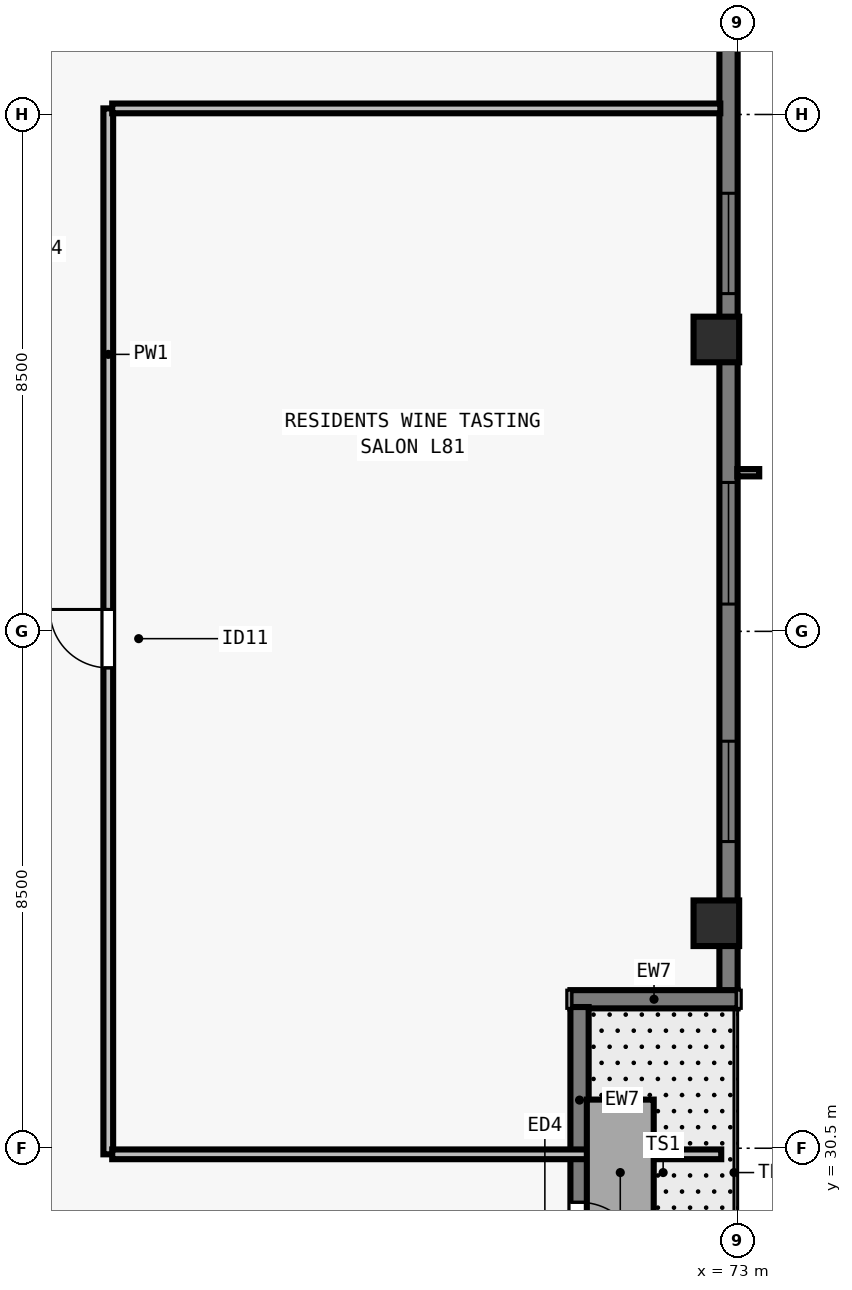
"""IFC4 building model, lengths in metres.
Left out: names, types, materials, properties, quantities, classifications, styles, units other than length and angle.
Written with IfcOpenShell. Run it as: python <this file> out.ifc"""

import sys

from ifc_helpers import new_model, si_unit, direction, frame, frame_2d, origin, origin_2d, place, context, subcontext, project, spatial, rectangle, extrude, element, fill, save


model = new_model("IFC4")
c1 = context("Model", 3, precision=1e-05, world=origin(), true_north=direction((0.0, 1.0)))
c2 = subcontext(c1, "Body", "Model", "MODEL_VIEW")
j1 = project(units=[si_unit("LENGTHUNIT", "METRE"), si_unit("PLANEANGLEUNIT", "RADIAN")], contexts=[c1])
p1 = place(None, origin())
s1 = spatial("IfcSite", under=j1, at=p1, CompositionType="ELEMENT")
p2 = place(p1, origin())
s2 = spatial("IfcBuilding", under=s1, at=p2, CompositionType="ELEMENT")
p3 = place(p2, frame((0.0, 0.0, 294.5)))
s3 = spatial("IfcBuildingStorey", under=s2, at=p3, CompositionType="ELEMENT", Elevation=294.5)
for number, where, z_axis, x_axis in (
    (1, (72.65, 34.2, 0.0), (0.0, 0.0, 1.0), (0.0, 1.0, 0.0)),
    (2, (72.65, 43.8, 0.0), (0.0, 0.0, 1.0), (0.0, 1.0, 0.0)),
):
    element("IfcColumn", number, at=place(p3, frame(where, z_axis=z_axis, x_axis=x_axis)), inside=s3, PredefinedType="COLUMN", context=c2, shape_type="SweptSolid", body=[
        extrude(rectangle(XDim=0.75, YDim=0.75, at=origin_2d()), origin(), (0.0, 0.0, 1.0), 3.5),
    ])
p4 = place(p3, frame((72.85, 54.5, 0.0), z_axis=(0.0, 0.0, 1.0), x_axis=(0.0, -1.0, 0.0)))
e3 = element("IfcWall", 3, at=p4, inside=s3, PredefinedType="SOLIDWALL", context=c2, shape_type="SweptSolid", body=[
    extrude(rectangle(XDim=21.422, YDim=0.3, at=frame_2d((10.711, 0.0))), origin(), (0.0, 0.0, 1.0), 3.29),
])
p5 = place(p4, frame((8.296, 0.0, 0.8)))
e4 = element("IfcOpeningElement", 4, at=p5, cuts=e3, PredefinedType="OPENING", context=c2, shape_type="SweptSolid", body=[
    extrude(rectangle(XDim=1.65, YDim=1.758, at=frame_2d((0.825, 0.879))), frame((0.0, 0.16, 0.0), z_axis=(0.0, -1.0, 0.0), x_axis=(1.0, 0.0, 0.0)), (0.0, 0.0, 1.0), 0.32),
])
p6 = place(p4, frame((13.051, 0.0, 0.8)))
e5 = element("IfcOpeningElement", 5, at=p6, cuts=e3, PredefinedType="OPENING", context=c2, shape_type="SweptSolid", body=[
    extrude(rectangle(XDim=2.0, YDim=1.758, at=frame_2d((1.0, 0.879))), frame((0.0, 0.16, 0.0), z_axis=(0.0, -1.0, 0.0), x_axis=(1.0, 0.0, 0.0)), (0.0, 0.0, 1.0), 0.32),
])
p7 = place(p4, frame((17.307, 0.0, 0.8)))
e6 = element("IfcOpeningElement", 6, at=p7, cuts=e3, PredefinedType="OPENING", context=c2, shape_type="SweptSolid", body=[
    extrude(rectangle(XDim=1.65, YDim=1.758, at=frame_2d((0.825, 0.879))), frame((0.0, 0.16, 0.0), z_axis=(0.0, -1.0, 0.0), x_axis=(1.0, 0.0, 0.0)), (0.0, 0.0, 1.0), 0.32),
])
p8 = place(p3, frame((73.0, 32.95, 0.0), z_axis=(0.0, 0.0, 1.0), x_axis=(-1.0, 0.0, 0.0)))
e7 = element("IfcWall", 7, at=p8, inside=s3, PredefinedType="SOLIDWALL", context=c2, shape_type="SweptSolid", body=[
    extrude(rectangle(XDim=2.75, YDim=0.3, at=frame_2d((1.375, 0.0))), origin(), (0.0, 0.0, 1.0), 3.29),
])
p9 = place(p3, frame((70.4, 32.822, 0.0), z_axis=(0.0, 0.0, 1.0), x_axis=(0.0, -1.0, 0.0)))
e8 = element("IfcWall", 8, at=p9, inside=s3, PredefinedType="SOLIDWALL", context=c2, shape_type="SweptSolid", body=[
    extrude(rectangle(XDim=5.722, YDim=0.3, at=frame_2d((2.861, 0.0))), origin(), (0.0, 0.0, 1.0), 3.29),
])
p10 = place(p9, frame((3.211, 0.0, 0.0)))
e9 = element("IfcOpeningElement", 9, at=p10, cuts=e8, PredefinedType="OPENING", context=c2, shape_type="SweptSolid", body=[
    extrude(rectangle(XDim=1.0, YDim=2.15, at=frame_2d((0.5, 1.075))), frame((0.0, 0.16, 0.0), z_axis=(0.0, -1.0, 0.0), x_axis=(1.0, 0.0, 0.0)), (0.0, 0.0, 1.0), 0.32),
])
p11 = place(p3, frame((62.65, 30.4, 0.0), z_axis=(0.0, 0.0, 1.0), x_axis=(0.0, 1.0, 0.0)))
e10 = element("IfcWall", 10, at=p11, inside=s3, PredefinedType="PARTITIONING", context=c2, shape_type="SweptSolid", body=[
    extrude(rectangle(XDim=17.2, YDim=0.16, at=frame_2d((8.6, 0.0))), origin(), (0.0, 0.0, 1.0), 3.29),
])
p12 = place(p11, frame((8.0, 0.0, 0.0)))
e11 = element("IfcOpeningElement", 11, at=p12, cuts=e10, PredefinedType="OPENING", context=c2, shape_type="SweptSolid", body=[
    extrude(rectangle(XDim=0.96, YDim=2.12, at=frame_2d((0.48, 1.06))), frame((0.0, 0.09, 0.0), z_axis=(0.0, -1.0, 0.0), x_axis=(1.0, 0.0, 0.0)), (0.0, 0.0, 1.0), 0.18),
])
p13 = place(p3, frame((62.715, 30.4, 0.0), z_axis=(0.0, 0.0, 1.0), x_axis=(1.0, 0.0, 0.0)))
e12 = element("IfcWall", 12, at=p13, inside=s3, PredefinedType="PARTITIONING", context=c2, shape_type="SweptSolid", body=[
    extrude(rectangle(XDim=10.015, YDim=0.16, at=frame_2d((5.007, 0.0))), origin(), (0.0, 0.0, 1.0), 3.29),
])
p14 = place(p3, frame((62.715, 47.6, 0.0), z_axis=(0.0, 0.0, 1.0), x_axis=(1.0, 0.0, 0.0)))
e13 = element("IfcWall", 13, at=p14, inside=s3, PredefinedType="PARTITIONING", context=c2, shape_type="SweptSolid", body=[
    extrude(rectangle(XDim=10.0, YDim=0.16, at=frame_2d((5.0, 0.0))), origin(), (0.0, 0.0, 1.0), 3.29),
])
p15 = place(p5, origin())
e14 = element("IfcWindow", 14, at=p15, inside=s3, PartitioningType="SINGLE_PANEL", PredefinedType="WINDOW", context=c2, shape_type="SweptSolid", body=[
    extrude(rectangle(XDim=1.65, YDim=1.758, at=frame_2d((0.825, 0.879))), frame((0.0, -0.05, 0.0), z_axis=(0.0, -1.0, 0.0), x_axis=(1.0, 0.0, 0.0)), (0.0, 0.0, 1.0), 0.06),
])
fill(e4, e14)
p16 = place(p6, origin())
e15 = element("IfcWindow", 15, at=p16, inside=s3, PartitioningType="SINGLE_PANEL", PredefinedType="WINDOW", context=c2, shape_type="SweptSolid", body=[
    extrude(rectangle(XDim=2.0, YDim=1.758, at=frame_2d((1.0, 0.879))), frame((0.0, -0.05, 0.0), z_axis=(0.0, -1.0, 0.0), x_axis=(1.0, 0.0, 0.0)), (0.0, 0.0, 1.0), 0.06),
])
fill(e5, e15)
p17 = place(p7, origin())
e16 = element("IfcWindow", 16, at=p17, inside=s3, PartitioningType="SINGLE_PANEL", PredefinedType="WINDOW", context=c2, shape_type="SweptSolid", body=[
    extrude(rectangle(XDim=1.65, YDim=1.758, at=frame_2d((0.825, 0.879))), frame((0.0, -0.05, 0.0), z_axis=(0.0, -1.0, 0.0), x_axis=(1.0, 0.0, 0.0)), (0.0, 0.0, 1.0), 0.06),
])
fill(e6, e16)
p18 = place(p10, origin())
e17 = element("IfcDoor", 17, at=p18, inside=s3, OperationType="SINGLE_SWING_RIGHT", PredefinedType="DOOR", context=c2, shape_type="SweptSolid", body=[
    extrude(rectangle(XDim=1.0, YDim=2.15, at=frame_2d((0.5, 1.075))), frame((0.0, 0.025, 0.0), z_axis=(0.0, -1.0, 0.0), x_axis=(1.0, 0.0, 0.0)), (0.0, 0.0, 1.0), 0.05),
])
fill(e9, e17)
p19 = place(p12, origin())
e18 = element("IfcDoor", 18, at=p19, inside=s3, OperationType="SINGLE_SWING_RIGHT", PredefinedType="DOOR", context=c2, shape_type="SweptSolid", body=[
    extrude(rectangle(XDim=0.96, YDim=2.12, at=frame_2d((0.48, 1.06))), frame((0.0, 0.025, 0.0), z_axis=(0.0, -1.0, 0.0), x_axis=(1.0, 0.0, 0.0)), (0.0, 0.0, 1.0), 0.05),
])
fill(e11, e18)
save(model, sys.argv[1])
